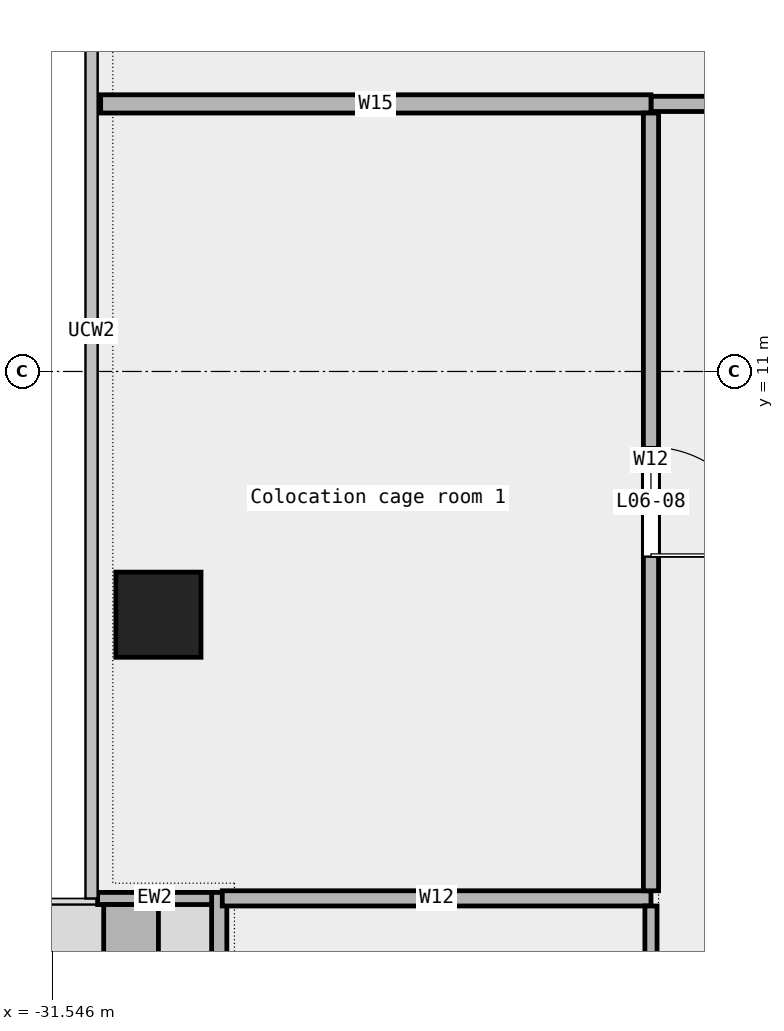
"""IFC4 building model, lengths in metres.
Left out: names, types, materials, properties, quantities, classifications, styles, units other than length and angle.
Written with IfcOpenShell. Run it as: python <this file> out.ifc"""

import sys

from ifc_helpers import new_model, si_unit, direction, frame, frame_2d, origin, origin_2d, place, context, subcontext, project, spatial, rectangle, extrude, element, fill, save


model = new_model("IFC4")
c1 = context("Model", 3, precision=1e-05, world=origin(), true_north=direction((0.0, 1.0)))
c2 = subcontext(c1, "Body", "Model", "MODEL_VIEW")
j1 = project(units=[si_unit("LENGTHUNIT", "METRE"), si_unit("PLANEANGLEUNIT", "RADIAN")], contexts=[c1])
p1 = place(None, origin())
s1 = spatial("IfcSite", under=j1, at=p1, CompositionType="ELEMENT")
p2 = place(p1, origin())
s2 = spatial("IfcBuilding", under=s1, at=p2, CompositionType="ELEMENT")
p3 = place(p2, frame((0.0, 0.0, 35.8)))
s3 = spatial("IfcBuildingStorey", under=s2, at=p3, CompositionType="ELEMENT", Elevation=35.8)
p4 = place(p3, frame((-29.8, 7.0, 0.0), z_axis=(0.0, 0.0, 1.0), x_axis=(1.0, 0.0, 0.0)))
e1 = element("IfcColumn", 1, at=p4, inside=s3, PredefinedType="COLUMN", context=c2, shape_type="SweptSolid", body=[
    extrude(rectangle(XDim=1.4, YDim=1.4, at=origin_2d()), origin(), (0.0, 0.0, 1.0), 4.35),
])
p5 = place(p3, frame((-28.8, 2.433, 0.0), z_axis=(0.0, 0.0, 1.0), x_axis=(0.0, -1.0, 0.0)))
e2 = element("IfcWall", 2, at=p5, inside=s3, PredefinedType="STANDARD", context=c2, shape_type="SweptSolid", body=[
    extrude(rectangle(XDim=14.2, YDim=0.25, at=frame_2d((7.1, 0.0))), origin(), (0.0, 0.0, 1.0), 4.35),
])
p6 = place(p5, frame((1.75, 0.0, 0.45)))
e3 = element("IfcOpeningElement", 3, at=p6, cuts=e2, PredefinedType="OPENING", context=c2, shape_type="SweptSolid", body=[
    extrude(rectangle(XDim=1.5, YDim=3.0, at=frame_2d((0.75, 1.5))), frame((0.0, 0.137, 0.0), z_axis=(0.0, -1.0, 0.0), x_axis=(1.0, 0.0, 0.0)), (0.0, 0.0, 1.0), 0.274),
])
p7 = place(p5, frame((6.25, 0.0, 0.0)))
e4 = element("IfcOpeningElement", 4, at=p7, cuts=e2, PredefinedType="OPENING", context=c2, shape_type="SweptSolid", body=[
    extrude(rectangle(XDim=1.8, YDim=2.4, at=frame_2d((0.9, 1.2))), frame((0.0, 0.137, 0.0), z_axis=(0.0, -1.0, 0.0), x_axis=(1.0, 0.0, 0.0)), (0.0, 0.0, 1.0), 0.274),
])
p8 = place(p5, frame((11.0, 0.0, 0.45)))
e5 = element("IfcOpeningElement", 5, at=p8, cuts=e2, PredefinedType="OPENING", context=c2, shape_type="SweptSolid", body=[
    extrude(rectangle(XDim=1.5, YDim=3.0, at=frame_2d((0.75, 1.5))), frame((0.0, 0.137, 0.0), z_axis=(0.0, -1.0, 0.0), x_axis=(1.0, 0.0, 0.0)), (0.0, 0.0, 1.0), 0.274),
])
p9 = place(p3, frame((-30.8, 2.333, 0.0), z_axis=(0.0, 0.0, 1.0), x_axis=(1.0, 0.0, 0.0)))
e6 = element("IfcWall", 6, at=p9, inside=s3, PredefinedType="STANDARD", context=c2, shape_type="SweptSolid", body=[
    extrude(rectangle(XDim=1.875, YDim=0.2, at=frame_2d((0.938, 0.0))), origin(), (0.0, 0.0, 1.0), 4.35),
])
p10 = place(p3, frame((-30.25, 2.233, 0.0), z_axis=(0.0, 0.0, 1.0), x_axis=(0.0, -1.0, 0.0)))
e7 = element("IfcWall", 7, at=p10, inside=s3, PredefinedType="STANDARD", context=c2, shape_type="SweptSolid", body=[
    extrude(rectangle(XDim=3.6, YDim=0.9, at=frame_2d((1.8, 0.0))), origin(), (0.0, 0.0, 1.0), 0.7),
])
p11 = place(p3, frame((-28.75, 2.335, 0.0), z_axis=(0.0, 0.0, 1.0), x_axis=(1.0, 0.0, 0.0)))
e8 = element("IfcWall", 8, at=p11, inside=s3, PredefinedType="PARTITIONING", context=c2, shape_type="SweptSolid", body=[
    extrude(rectangle(XDim=7.05, YDim=0.25, at=frame_2d((3.525, 0.0))), origin(), (0.0, 0.0, 1.0), 4.35),
])
p12 = place(p3, frame((-21.7, 15.4, 0.0), z_axis=(0.0, 0.0, 1.0), x_axis=(1.0, 0.0, 0.0)))
e9 = element("IfcWall", 9, at=p12, inside=s3, PredefinedType="PARTITIONING", context=c2, shape_type="SweptSolid", body=[
    extrude(rectangle(XDim=14.935, YDim=0.25, at=frame_2d((7.468, 0.0))), origin(), (0.0, 0.0, 1.0), 4.35),
])
p13 = place(p12, frame((12.775, 0.0, 0.0)))
e10 = element("IfcOpeningElement", 10, at=p13, cuts=e9, PredefinedType="OPENING", context=c2, shape_type="SweptSolid", body=[
    extrude(rectangle(XDim=0.9, YDim=2.1, at=frame_2d((0.45, 1.05))), frame((0.0, 0.137, 0.0), z_axis=(0.0, -1.0, 0.0), x_axis=(1.0, 0.0, 0.0)), (0.0, 0.0, 1.0), 0.274),
])
p14 = place(p12, frame((7.558, 0.0, 0.0)))
e11 = element("IfcOpeningElement", 11, at=p14, cuts=e9, PredefinedType="OPENING", context=c2, shape_type="SweptSolid", body=[
    extrude(rectangle(XDim=1.8, YDim=2.1, at=frame_2d((0.9, 1.05))), frame((0.0, 0.137, 0.0), z_axis=(0.0, -1.0, 0.0), x_axis=(1.0, 0.0, 0.0)), (0.0, 0.0, 1.0), 0.274),
])
p15 = place(p3, frame((-30.75, 15.4, 0.0), z_axis=(0.0, 0.0, 1.0), x_axis=(1.0, 0.0, 0.0)))
e12 = element("IfcWall", 12, at=p15, inside=s3, PredefinedType="PARTITIONING", context=c2, shape_type="SweptSolid", body=[
    extrude(rectangle(XDim=9.05, YDim=0.3, at=frame_2d((4.525, 0.0))), origin(), (0.0, 0.0, 1.0), 4.35),
])
p16 = place(p3, frame((-21.7, -9.0, 0.0), z_axis=(0.0, 0.0, 1.0), x_axis=(0.0, 1.0, 0.0)))
e13 = element("IfcWall", 13, at=p16, inside=s3, PredefinedType="PARTITIONING", context=c2, shape_type="SweptSolid", body=[
    extrude(rectangle(XDim=11.21, YDim=0.2, at=frame_2d((5.605, 0.0))), origin(), (0.0, 0.0, 1.0), 4.35),
])
p17 = place(p16, frame((4.705, 0.0, 0.0)))
e14 = element("IfcOpeningElement", 14, at=p17, cuts=e13, PredefinedType="OPENING", context=c2, shape_type="SweptSolid", body=[
    extrude(rectangle(XDim=1.8, YDim=2.1, at=frame_2d((0.9, 1.05))), frame((0.0, 0.112, 0.0), z_axis=(0.0, -1.0, 0.0), x_axis=(1.0, 0.0, 0.0)), (0.0, 0.0, 1.0), 0.224),
])
p18 = place(p3, frame((-21.7, 2.46, 0.0), z_axis=(0.0, 0.0, 1.0), x_axis=(0.0, 1.0, 0.0)))
e15 = element("IfcWall", 15, at=p18, inside=s3, PredefinedType="PARTITIONING", context=c2, shape_type="SweptSolid", body=[
    extrude(rectangle(XDim=12.79, YDim=0.25, at=frame_2d((6.395, 0.0))), origin(), (0.0, 0.0, 1.0), 4.35),
])
p19 = place(p18, frame((5.495, 0.0, 0.0)))
e16 = element("IfcOpeningElement", 16, at=p19, cuts=e15, PredefinedType="OPENING", context=c2, shape_type="SweptSolid", body=[
    extrude(rectangle(XDim=1.8, YDim=2.1, at=frame_2d((0.9, 1.05))), frame((0.0, 0.137, 0.0), z_axis=(0.0, -1.0, 0.0), x_axis=(1.0, 0.0, 0.0)), (0.0, 0.0, 1.0), 0.274),
])
p20 = place(p19, origin())
e17 = element("IfcDoor", 17, at=p20, inside=s3, OperationType="DOUBLE_DOOR_SINGLE_SWING", PredefinedType="DOOR", context=c2, shape_type="SweptSolid", body=[
    extrude(rectangle(XDim=1.8, YDim=2.1, at=frame_2d((0.9, 1.05))), frame((0.0, 0.025, 0.0), z_axis=(0.0, -1.0, 0.0), x_axis=(1.0, 0.0, 0.0)), (0.0, 0.0, 1.0), 0.05),
])
fill(e16, e17)
save(model, sys.argv[1])
